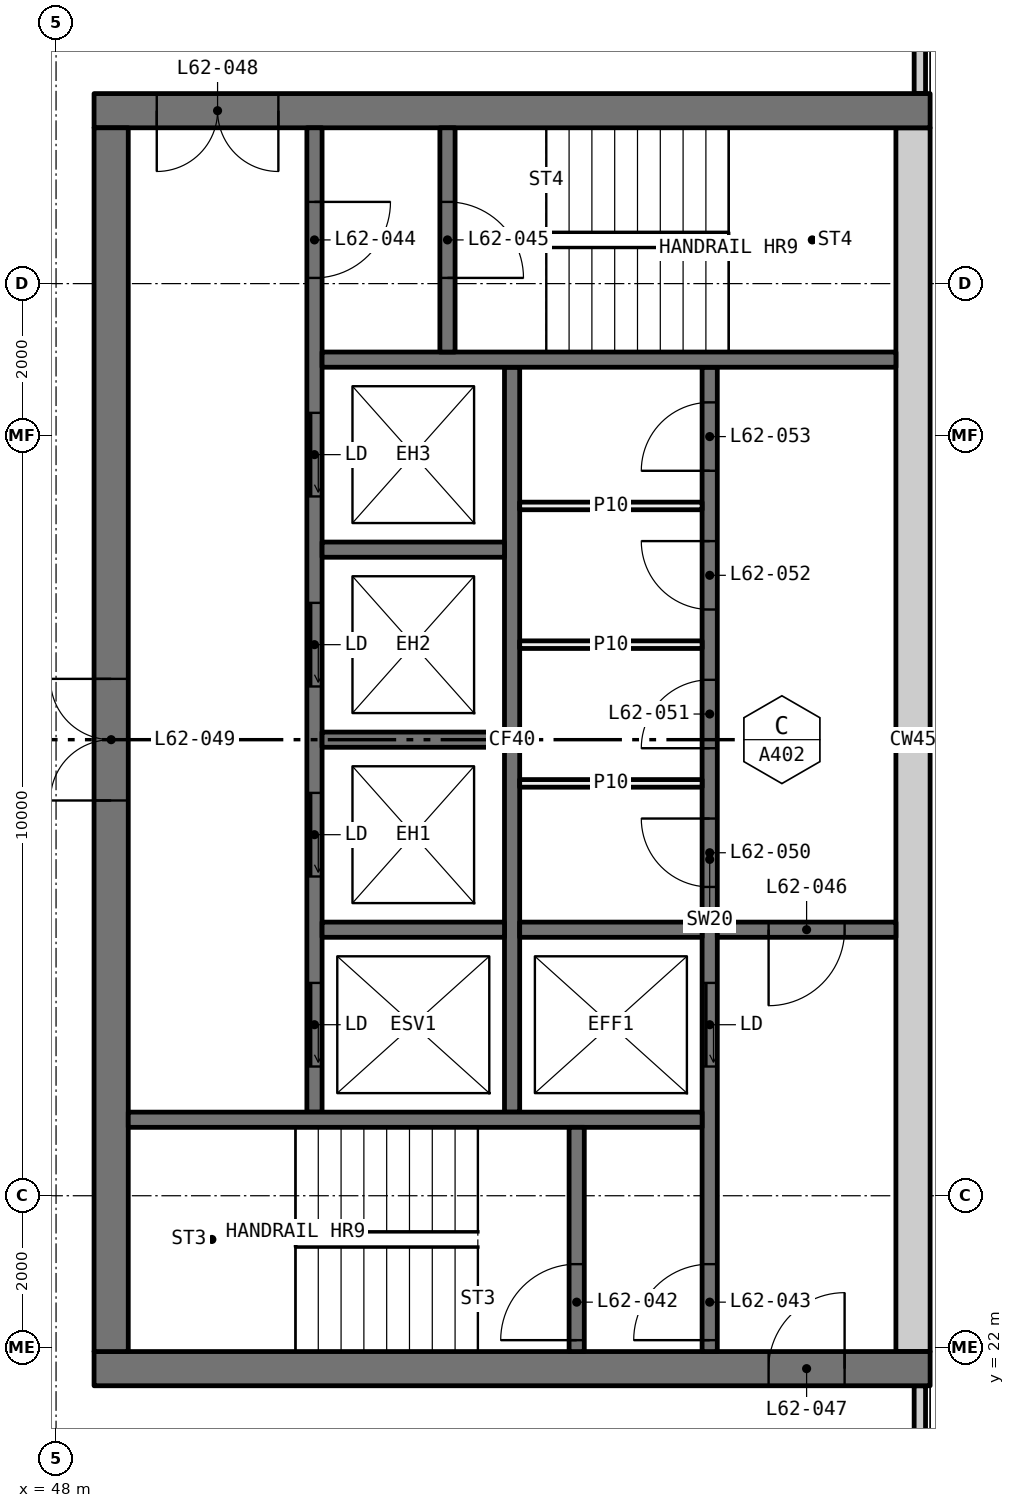
"""IFC4 building model, lengths in metres.
Left out: names, types, materials, properties, quantities, classifications, styles, units other than length and angle.
Written with IfcOpenShell. Run it as: python <this file> out.ifc"""

import sys

from ifc_helpers import new_model, si_unit, direction, frame, frame_2d, origin, place, context, subcontext, project, spatial, rectangle, extrude, element, fill, save


model = new_model("IFC4")
c1 = context("Model", 3, precision=1e-05, world=origin(), true_north=direction((0.0, 1.0)))
c2 = subcontext(c1, "Body", "Model", "MODEL_VIEW")
j1 = project(units=[si_unit("LENGTHUNIT", "METRE"), si_unit("PLANEANGLEUNIT", "RADIAN")], contexts=[c1])
p1 = place(None, origin())
s1 = spatial("IfcSite", under=j1, at=p1, CompositionType="ELEMENT")
p2 = place(p1, origin())
s2 = spatial("IfcBuilding", under=s1, at=p2, CompositionType="ELEMENT")
p3 = place(p2, frame((0.0, 0.0, 231.75)))
s3 = spatial("IfcBuildingStorey", under=s2, at=p3, CompositionType="ELEMENT", Elevation=231.75)
for number, where, z_axis, x_axis in (
    (1, (59.365, 18.71, 0.0), (0.0, 0.0, 1.0), (0.0, 1.0, 0.0)),
    (2, (59.365, 38.5, 0.0), (0.0, 0.0, 1.0), (0.0, 1.0, 0.0)),
):
    element("IfcWall", number, at=place(p3, frame(where, z_axis=z_axis, x_axis=x_axis)), inside=s3, PredefinedType="ELEMENTEDWALL", context=c2, shape_type="SweptSolid", body=[
        extrude(rectangle(XDim=2.79, YDim=0.15, at=frame_2d((1.395, 0.0))), origin(), (0.0, 0.0, 1.0), 3.05),
    ])
p4 = place(p3, frame((59.5, 21.725, 0.0), z_axis=(0.0, 0.0, 1.0), x_axis=(-1.0, 0.0, 0.0)))
e3 = element("IfcWall", 3, at=p4, inside=s3, PredefinedType="SHEAR", context=c2, shape_type="SweptSolid", body=[
    extrude(rectangle(XDim=11.0, YDim=0.45, at=frame_2d((5.5, 0.0))), origin(), (0.0, 0.0, 1.0), 3.05),
])
p5 = place(p4, frame((1.125, 0.0, 0.0)))
e4 = element("IfcOpeningElement", 4, at=p5, cuts=e3, PredefinedType="OPENING", context=c2, shape_type="SweptSolid", body=[
    extrude(rectangle(XDim=1.0, YDim=2.1, at=frame_2d((0.5, 1.05))), frame((0.0, 0.235, 0.0), z_axis=(0.0, -1.0, 0.0), x_axis=(1.0, 0.0, 0.0)), (0.0, 0.0, 1.0), 0.47),
])
p6 = place(p3, frame((59.5, 38.275, 0.0), z_axis=(0.0, 0.0, 1.0), x_axis=(-1.0, 0.0, 0.0)))
e5 = element("IfcWall", 5, at=p6, inside=s3, PredefinedType="SHEAR", context=c2, shape_type="SweptSolid", body=[
    extrude(rectangle(XDim=11.0, YDim=0.45, at=frame_2d((5.5, 0.0))), origin(), (0.0, 0.0, 1.0), 3.05),
])
p7 = place(p6, frame((8.575, 0.0, 0.0)))
e6 = element("IfcOpeningElement", 6, at=p7, cuts=e5, PredefinedType="OPENING", context=c2, shape_type="SweptSolid", body=[
    extrude(rectangle(XDim=1.6, YDim=2.1, at=frame_2d((0.8, 1.05))), frame((0.0, 0.235, 0.0), z_axis=(0.0, -1.0, 0.0), x_axis=(1.0, 0.0, 0.0)), (0.0, 0.0, 1.0), 0.47),
])
p8 = place(p3, frame((59.275, 21.95, 0.0), z_axis=(0.0, 0.0, 1.0), x_axis=(0.0, 1.0, 0.0)))
e7 = element("IfcWall", 7, at=p8, inside=s3, PredefinedType="SHEAR", context=c2, shape_type="SweptSolid", body=[
    extrude(rectangle(XDim=16.1, YDim=0.45, at=frame_2d((8.05, 0.0))), origin(), (0.0, 0.0, 1.0), 3.05),
])
p9 = place(p3, frame((48.725, 21.95, 0.0), z_axis=(0.0, 0.0, 1.0), x_axis=(0.0, 1.0, 0.0)))
e8 = element("IfcWall", 8, at=p9, inside=s3, PredefinedType="SHEAR", context=c2, shape_type="SweptSolid", body=[
    extrude(rectangle(XDim=16.1, YDim=0.45, at=frame_2d((8.05, 0.0))), origin(), (0.0, 0.0, 1.0), 3.05),
])
p10 = place(p9, frame((7.25, 0.0, 0.0)))
e9 = element("IfcOpeningElement", 9, at=p10, cuts=e8, PredefinedType="OPENING", context=c2, shape_type="SweptSolid", body=[
    extrude(rectangle(XDim=1.6, YDim=2.1, at=frame_2d((0.8, 1.05))), frame((0.0, 0.235, 0.0), z_axis=(0.0, -1.0, 0.0), x_axis=(1.0, 0.0, 0.0)), (0.0, 0.0, 1.0), 0.47),
])
p11 = place(p3, frame((56.6, 21.95, 0.0), z_axis=(0.0, 0.0, 1.0), x_axis=(0.0, 1.0, 0.0)))
e10 = element("IfcWall", 10, at=p11, inside=s3, PredefinedType="SOLIDWALL", context=c2, shape_type="SweptSolid", body=[
    extrude(rectangle(XDim=12.95, YDim=0.2, at=frame_2d((6.475, 0.0))), origin(), (0.0, 0.0, 1.0), 3.05),
])
p12 = place(p11, frame((3.75, 0.0, 0.0)))
e11 = element("IfcOpeningElement", 11, at=p12, cuts=e10, PredefinedType="OPENING", context=c2, shape_type="SweptSolid", body=[
    extrude(rectangle(XDim=1.1, YDim=2.1, at=frame_2d((0.55, 1.05))), frame((0.0, 0.11, 0.0), z_axis=(0.0, -1.0, 0.0), x_axis=(1.0, 0.0, 0.0)), (0.0, 0.0, 1.0), 0.22),
])
p13 = place(p11, frame((0.15, 0.0, 0.0)))
e12 = element("IfcOpeningElement", 12, at=p13, cuts=e10, PredefinedType="OPENING", context=c2, shape_type="SweptSolid", body=[
    extrude(rectangle(XDim=1.0, YDim=2.1, at=frame_2d((0.5, 1.05))), frame((0.0, 0.11, 0.0), z_axis=(0.0, -1.0, 0.0), x_axis=(1.0, 0.0, 0.0)), (0.0, 0.0, 1.0), 0.22),
])
p14 = place(p11, frame((6.113, 0.0, 0.0)))
e13 = element("IfcOpeningElement", 13, at=p14, cuts=e10, PredefinedType="OPENING", context=c2, shape_type="SweptSolid", body=[
    extrude(rectangle(XDim=0.9, YDim=2.1, at=frame_2d((0.45, 1.05))), frame((0.0, 0.11, 0.0), z_axis=(0.0, -1.0, 0.0), x_axis=(1.0, 0.0, 0.0)), (0.0, 0.0, 1.0), 0.22),
])
p15 = place(p11, frame((7.938, 0.0, 0.0)))
e14 = element("IfcOpeningElement", 14, at=p15, cuts=e10, PredefinedType="OPENING", context=c2, shape_type="SweptSolid", body=[
    extrude(rectangle(XDim=0.9, YDim=2.1, at=frame_2d((0.45, 1.05))), frame((0.0, 0.11, 0.0), z_axis=(0.0, -1.0, 0.0), x_axis=(1.0, 0.0, 0.0)), (0.0, 0.0, 1.0), 0.22),
])
p16 = place(p11, frame((9.762, 0.0, 0.0)))
e15 = element("IfcOpeningElement", 15, at=p16, cuts=e10, PredefinedType="OPENING", context=c2, shape_type="SweptSolid", body=[
    extrude(rectangle(XDim=0.9, YDim=2.1, at=frame_2d((0.45, 1.05))), frame((0.0, 0.11, 0.0), z_axis=(0.0, -1.0, 0.0), x_axis=(1.0, 0.0, 0.0)), (0.0, 0.0, 1.0), 0.22),
])
p17 = place(p11, frame((11.587, 0.0, 0.0)))
e16 = element("IfcOpeningElement", 16, at=p17, cuts=e10, PredefinedType="OPENING", context=c2, shape_type="SweptSolid", body=[
    extrude(rectangle(XDim=0.9, YDim=2.1, at=frame_2d((0.45, 1.05))), frame((0.0, 0.11, 0.0), z_axis=(0.0, -1.0, 0.0), x_axis=(1.0, 0.0, 0.0)), (0.0, 0.0, 1.0), 0.22),
])
p18 = place(p3, frame((51.4, 25.1, 0.0), z_axis=(0.0, 0.0, 1.0), x_axis=(0.0, 1.0, 0.0)))
e17 = element("IfcWall", 17, at=p18, inside=s3, PredefinedType="SOLIDWALL", context=c2, shape_type="SweptSolid", body=[
    extrude(rectangle(XDim=12.95, YDim=0.2, at=frame_2d((6.475, 0.0))), origin(), (0.0, 0.0, 1.0), 3.05),
])
p19 = place(p18, frame((0.6, 0.0, 0.0)))
e18 = element("IfcOpeningElement", 18, at=p19, cuts=e17, PredefinedType="OPENING", context=c2, shape_type="SweptSolid", body=[
    extrude(rectangle(XDim=1.1, YDim=2.1, at=frame_2d((0.55, 1.05))), frame((0.0, 0.11, 0.0), z_axis=(0.0, -1.0, 0.0), x_axis=(1.0, 0.0, 0.0)), (0.0, 0.0, 1.0), 0.22),
])
p20 = place(p18, frame((3.1, 0.0, 0.0)))
e19 = element("IfcOpeningElement", 19, at=p20, cuts=e17, PredefinedType="OPENING", context=c2, shape_type="SweptSolid", body=[
    extrude(rectangle(XDim=1.1, YDim=2.1, at=frame_2d((0.55, 1.05))), frame((0.0, 0.11, 0.0), z_axis=(0.0, -1.0, 0.0), x_axis=(1.0, 0.0, 0.0)), (0.0, 0.0, 1.0), 0.22),
])
p21 = place(p18, frame((5.6, 0.0, 0.0)))
e20 = element("IfcOpeningElement", 20, at=p21, cuts=e17, PredefinedType="OPENING", context=c2, shape_type="SweptSolid", body=[
    extrude(rectangle(XDim=1.1, YDim=2.1, at=frame_2d((0.55, 1.05))), frame((0.0, 0.11, 0.0), z_axis=(0.0, -1.0, 0.0), x_axis=(1.0, 0.0, 0.0)), (0.0, 0.0, 1.0), 0.22),
])
p22 = place(p18, frame((8.1, 0.0, 0.0)))
e21 = element("IfcOpeningElement", 21, at=p22, cuts=e17, PredefinedType="OPENING", context=c2, shape_type="SweptSolid", body=[
    extrude(rectangle(XDim=1.1, YDim=2.1, at=frame_2d((0.55, 1.05))), frame((0.0, 0.11, 0.0), z_axis=(0.0, -1.0, 0.0), x_axis=(1.0, 0.0, 0.0)), (0.0, 0.0, 1.0), 0.22),
])
p23 = place(p18, frame((10.975, 0.0, 0.0)))
e22 = element("IfcOpeningElement", 22, at=p23, cuts=e17, PredefinedType="OPENING", context=c2, shape_type="SweptSolid", body=[
    extrude(rectangle(XDim=1.0, YDim=2.1, at=frame_2d((0.5, 1.05))), frame((0.0, 0.11, 0.0), z_axis=(0.0, -1.0, 0.0), x_axis=(1.0, 0.0, 0.0)), (0.0, 0.0, 1.0), 0.22),
])
p24 = place(p3, frame((54.0, 25.1, 0.0), z_axis=(0.0, 0.0, 1.0), x_axis=(0.0, 1.0, 0.0)))
e23 = element("IfcWall", 23, at=p24, inside=s3, PredefinedType="SOLIDWALL", context=c2, shape_type="SweptSolid", body=[
    extrude(rectangle(XDim=9.8, YDim=0.2, at=frame_2d((4.9, 0.0))), origin(), (0.0, 0.0, 1.0), 3.05),
])
for number, where, z_axis, x_axis in (
    (24, (56.5, 25.0, 0.0), (0.0, 0.0, 1.0), (-1.0, 0.0, 0.0)),
    (25, (59.05, 35.0, 0.0), (0.0, 0.0, 1.0), (-1.0, 0.0, 0.0)),
):
    element("IfcWall", number, at=place(p3, frame(where, z_axis=z_axis, x_axis=x_axis)), inside=s3, PredefinedType="SOLIDWALL", context=c2, shape_type="SweptSolid", body=[
        extrude(rectangle(XDim=7.55, YDim=0.2, at=frame_2d((3.775, 0.0))), origin(), (0.0, 0.0, 1.0), 3.05),
    ])
p25 = place(p3, frame((59.05, 27.5, 0.0), z_axis=(0.0, 0.0, 1.0), x_axis=(-1.0, 0.0, 0.0)))
e26 = element("IfcWall", 26, at=p25, inside=s3, PredefinedType="SOLIDWALL", context=c2, shape_type="SweptSolid", body=[
    extrude(rectangle(XDim=2.35, YDim=0.2, at=frame_2d((1.175, 0.0))), origin(), (0.0, 0.0, 1.0), 3.05),
])
p26 = place(p25, frame((0.675, 0.0, 0.0)))
e27 = element("IfcOpeningElement", 27, at=p26, cuts=e26, PredefinedType="OPENING", context=c2, shape_type="SweptSolid", body=[
    extrude(rectangle(XDim=1.0, YDim=2.1, at=frame_2d((0.5, 1.05))), frame((0.0, 0.11, 0.0), z_axis=(0.0, -1.0, 0.0), x_axis=(1.0, 0.0, 0.0)), (0.0, 0.0, 1.0), 0.22),
])
p27 = place(p3, frame((54.85, 21.95, 0.0), z_axis=(0.0, 0.0, 1.0), x_axis=(0.0, 1.0, 0.0)))
e28 = element("IfcWall", 28, at=p27, inside=s3, PredefinedType="SOLIDWALL", context=c2, shape_type="SweptSolid", body=[
    extrude(rectangle(XDim=2.95, YDim=0.2, at=frame_2d((1.475, 0.0))), origin(), (0.0, 0.0, 1.0), 3.05),
])
p28 = place(p27, frame((0.15, 0.0, 0.0)))
e29 = element("IfcOpeningElement", 29, at=p28, cuts=e28, PredefinedType="OPENING", context=c2, shape_type="SweptSolid", body=[
    extrude(rectangle(XDim=1.0, YDim=2.1, at=frame_2d((0.5, 1.05))), frame((0.0, 0.11, 0.0), z_axis=(0.0, -1.0, 0.0), x_axis=(1.0, 0.0, 0.0)), (0.0, 0.0, 1.0), 0.22),
])
p29 = place(p3, frame((53.15, 35.1, 0.0), z_axis=(0.0, 0.0, 1.0), x_axis=(0.0, 1.0, 0.0)))
e30 = element("IfcWall", 30, at=p29, inside=s3, PredefinedType="SOLIDWALL", context=c2, shape_type="SweptSolid", body=[
    extrude(rectangle(XDim=2.95, YDim=0.2, at=frame_2d((1.475, 0.0))), origin(), (0.0, 0.0, 1.0), 3.05),
])
p30 = place(p29, frame((0.975, 0.0, 0.0)))
e31 = element("IfcOpeningElement", 31, at=p30, cuts=e30, PredefinedType="OPENING", context=c2, shape_type="SweptSolid", body=[
    extrude(rectangle(XDim=1.0, YDim=2.1, at=frame_2d((0.5, 1.05))), frame((0.0, 0.11, 0.0), z_axis=(0.0, -1.0, 0.0), x_axis=(1.0, 0.0, 0.0)), (0.0, 0.0, 1.0), 0.22),
])
for number, where, z_axis, x_axis in (
    (32, (56.5, 27.5, 0.0), (0.0, 0.0, 1.0), (-1.0, 0.0, 0.0)),
    (33, (53.9, 27.5, 0.0), (0.0, 0.0, 1.0), (-1.0, 0.0, 0.0)),
    (34, (53.9, 30.0, 0.0), (0.0, 0.0, 1.0), (-1.0, 0.0, 0.0)),
    (35, (53.9, 32.5, 0.0), (0.0, 0.0, 1.0), (-1.0, 0.0, 0.0)),
):
    element("IfcWall", number, at=place(p3, frame(where, z_axis=z_axis, x_axis=x_axis)), inside=s3, PredefinedType="SOLIDWALL", context=c2, shape_type="SweptSolid", body=[
        extrude(rectangle(XDim=2.4, YDim=0.2, at=frame_2d((1.2, 0.0))), origin(), (0.0, 0.0, 1.0), 3.05),
    ])
for number, where, z_axis, x_axis in (
    (36, (56.5, 29.425, 0.0), (0.0, 0.0, 1.0), (-1.0, 0.0, 0.0)),
    (37, (56.5, 31.25, 0.0), (0.0, 0.0, 1.0), (-1.0, 0.0, 0.0)),
    (38, (56.5, 33.075, 0.0), (0.0, 0.0, 1.0), (-1.0, 0.0, 0.0)),
):
    element("IfcWall", number, at=place(p3, frame(where, z_axis=z_axis, x_axis=x_axis)), inside=s3, PredefinedType="PARTITIONING", context=c2, shape_type="SweptSolid", body=[
        extrude(rectangle(XDim=2.4, YDim=0.1, at=frame_2d((1.2, 0.0))), origin(), (0.0, 0.0, 1.0), 3.05),
    ])
p31 = place(p19, origin())
e39 = element("IfcDoor", 39, at=p31, inside=s3, OperationType="SLIDING_TO_LEFT", PredefinedType="DOOR", context=c2, shape_type="SweptSolid", body=[
    extrude(rectangle(XDim=1.1, YDim=2.1, at=frame_2d((0.55, 1.05))), frame((0.0, 0.025, 0.0), z_axis=(0.0, -1.0, 0.0), x_axis=(1.0, 0.0, 0.0)), (0.0, 0.0, 1.0), 0.05),
])
fill(e18, e39)
p32 = place(p20, origin())
e40 = element("IfcDoor", 40, at=p32, inside=s3, OperationType="SLIDING_TO_LEFT", PredefinedType="DOOR", context=c2, shape_type="SweptSolid", body=[
    extrude(rectangle(XDim=1.1, YDim=2.1, at=frame_2d((0.55, 1.05))), frame((0.0, 0.025, 0.0), z_axis=(0.0, -1.0, 0.0), x_axis=(1.0, 0.0, 0.0)), (0.0, 0.0, 1.0), 0.05),
])
fill(e19, e40)
p33 = place(p21, origin())
e41 = element("IfcDoor", 41, at=p33, inside=s3, OperationType="SLIDING_TO_LEFT", PredefinedType="DOOR", context=c2, shape_type="SweptSolid", body=[
    extrude(rectangle(XDim=1.1, YDim=2.1, at=frame_2d((0.55, 1.05))), frame((0.0, 0.025, 0.0), z_axis=(0.0, -1.0, 0.0), x_axis=(1.0, 0.0, 0.0)), (0.0, 0.0, 1.0), 0.05),
])
fill(e20, e41)
p34 = place(p22, origin())
e42 = element("IfcDoor", 42, at=p34, inside=s3, OperationType="SLIDING_TO_LEFT", PredefinedType="DOOR", context=c2, shape_type="SweptSolid", body=[
    extrude(rectangle(XDim=1.1, YDim=2.1, at=frame_2d((0.55, 1.05))), frame((0.0, 0.025, 0.0), z_axis=(0.0, -1.0, 0.0), x_axis=(1.0, 0.0, 0.0)), (0.0, 0.0, 1.0), 0.05),
])
fill(e21, e42)
p35 = place(p12, origin())
e43 = element("IfcDoor", 43, at=p35, inside=s3, OperationType="SLIDING_TO_LEFT", PredefinedType="DOOR", context=c2, shape_type="SweptSolid", body=[
    extrude(rectangle(XDim=1.1, YDim=2.1, at=frame_2d((0.55, 1.05))), frame((0.0, 0.025, 0.0), z_axis=(0.0, -1.0, 0.0), x_axis=(1.0, 0.0, 0.0)), (0.0, 0.0, 1.0), 0.05),
])
fill(e11, e43)
p36 = place(p28, origin())
e44 = element("IfcDoor", 44, at=p36, inside=s3, OperationType="SINGLE_SWING_RIGHT", PredefinedType="DOOR", context=c2, shape_type="SweptSolid", body=[
    extrude(rectangle(XDim=1.0, YDim=2.1, at=frame_2d((0.5, 1.05))), frame((0.0, 0.025, 0.0), z_axis=(0.0, -1.0, 0.0), x_axis=(1.0, 0.0, 0.0)), (0.0, 0.0, 1.0), 0.05),
])
fill(e29, e44)
p37 = place(p13, origin())
e45 = element("IfcDoor", 45, at=p37, inside=s3, OperationType="SINGLE_SWING_RIGHT", PredefinedType="DOOR", context=c2, shape_type="SweptSolid", body=[
    extrude(rectangle(XDim=1.0, YDim=2.1, at=frame_2d((0.5, 1.05))), frame((0.0, 0.025, 0.0), z_axis=(0.0, -1.0, 0.0), x_axis=(1.0, 0.0, 0.0)), (0.0, 0.0, 1.0), 0.05),
])
fill(e12, e45)
p38 = place(p23, frame((1.0, 0.0, 0.0), x_axis=(-1.0, 0.0, 0.0)))
e46 = element("IfcDoor", 46, at=p38, inside=s3, OperationType="SINGLE_SWING_RIGHT", PredefinedType="DOOR", context=c2, shape_type="SweptSolid", body=[
    extrude(rectangle(XDim=1.0, YDim=2.1, at=frame_2d((0.5, 1.05))), frame((0.0, 0.025, 0.0), z_axis=(0.0, -1.0, 0.0), x_axis=(1.0, 0.0, 0.0)), (0.0, 0.0, 1.0), 0.05),
])
fill(e22, e46)
p39 = place(p30, frame((1.0, 0.0, 0.0), x_axis=(-1.0, 0.0, 0.0)))
e47 = element("IfcDoor", 47, at=p39, inside=s3, OperationType="SINGLE_SWING_LEFT", PredefinedType="DOOR", context=c2, shape_type="SweptSolid", body=[
    extrude(rectangle(XDim=1.0, YDim=2.1, at=frame_2d((0.5, 1.05))), frame((0.0, 0.025, 0.0), z_axis=(0.0, -1.0, 0.0), x_axis=(1.0, 0.0, 0.0)), (0.0, 0.0, 1.0), 0.05),
])
fill(e31, e47)
p40 = place(p26, origin())
e48 = element("IfcDoor", 48, at=p40, inside=s3, OperationType="SINGLE_SWING_LEFT", PredefinedType="DOOR", context=c2, shape_type="SweptSolid", body=[
    extrude(rectangle(XDim=1.0, YDim=2.1, at=frame_2d((0.5, 1.05))), frame((0.0, 0.025, 0.0), z_axis=(0.0, -1.0, 0.0), x_axis=(1.0, 0.0, 0.0)), (0.0, 0.0, 1.0), 0.05),
])
fill(e27, e48)
p41 = place(p5, frame((1.0, 0.0, 0.0), x_axis=(-1.0, 0.0, 0.0)))
e49 = element("IfcDoor", 49, at=p41, inside=s3, OperationType="SINGLE_SWING_LEFT", PredefinedType="DOOR", context=c2, shape_type="SweptSolid", body=[
    extrude(rectangle(XDim=1.0, YDim=2.1, at=frame_2d((0.5, 1.05))), frame((0.0, 0.025, 0.0), z_axis=(0.0, -1.0, 0.0), x_axis=(1.0, 0.0, 0.0)), (0.0, 0.0, 1.0), 0.05),
])
fill(e4, e49)
p42 = place(p7, origin())
e50 = element("IfcDoor", 50, at=p42, inside=s3, OperationType="DOUBLE_DOOR_SINGLE_SWING", PredefinedType="DOOR", context=c2, shape_type="SweptSolid", body=[
    extrude(rectangle(XDim=1.6, YDim=2.1, at=frame_2d((0.8, 1.05))), frame((0.0, 0.025, 0.0), z_axis=(0.0, -1.0, 0.0), x_axis=(1.0, 0.0, 0.0)), (0.0, 0.0, 1.0), 0.05),
])
fill(e6, e50)
p43 = place(p10, origin())
e51 = element("IfcDoor", 51, at=p43, inside=s3, OperationType="DOUBLE_DOOR_SINGLE_SWING", PredefinedType="DOOR", context=c2, shape_type="SweptSolid", body=[
    extrude(rectangle(XDim=1.6, YDim=2.1, at=frame_2d((0.8, 1.05))), frame((0.0, 0.025, 0.0), z_axis=(0.0, -1.0, 0.0), x_axis=(1.0, 0.0, 0.0)), (0.0, 0.0, 1.0), 0.05),
])
fill(e9, e51)
p44 = place(p14, origin())
e52 = element("IfcDoor", 52, at=p44, inside=s3, OperationType="SINGLE_SWING_LEFT", PredefinedType="DOOR", context=c2, shape_type="SweptSolid", body=[
    extrude(rectangle(XDim=0.9, YDim=2.1, at=frame_2d((0.45, 1.05))), frame((0.0, 0.025, 0.0), z_axis=(0.0, -1.0, 0.0), x_axis=(1.0, 0.0, 0.0)), (0.0, 0.0, 1.0), 0.05),
])
fill(e13, e52)
p45 = place(p15, origin())
e53 = element("IfcDoor", 53, at=p45, inside=s3, OperationType="SINGLE_SWING_RIGHT", PredefinedType="DOOR", context=c2, shape_type="SweptSolid", body=[
    extrude(rectangle(XDim=0.9, YDim=2.1, at=frame_2d((0.45, 1.05))), frame((0.0, 0.025, 0.0), z_axis=(0.0, -1.0, 0.0), x_axis=(1.0, 0.0, 0.0)), (0.0, 0.0, 1.0), 0.05),
])
fill(e14, e53)
p46 = place(p16, origin())
e54 = element("IfcDoor", 54, at=p46, inside=s3, OperationType="SINGLE_SWING_LEFT", PredefinedType="DOOR", context=c2, shape_type="SweptSolid", body=[
    extrude(rectangle(XDim=0.9, YDim=2.1, at=frame_2d((0.45, 1.05))), frame((0.0, 0.025, 0.0), z_axis=(0.0, -1.0, 0.0), x_axis=(1.0, 0.0, 0.0)), (0.0, 0.0, 1.0), 0.05),
])
fill(e15, e54)
p47 = place(p17, origin())
e55 = element("IfcDoor", 55, at=p47, inside=s3, OperationType="SINGLE_SWING_RIGHT", PredefinedType="DOOR", context=c2, shape_type="SweptSolid", body=[
    extrude(rectangle(XDim=0.9, YDim=2.1, at=frame_2d((0.45, 1.05))), frame((0.0, 0.025, 0.0), z_axis=(0.0, -1.0, 0.0), x_axis=(1.0, 0.0, 0.0)), (0.0, 0.0, 1.0), 0.05),
])
fill(e16, e55)
save(model, sys.argv[1])
